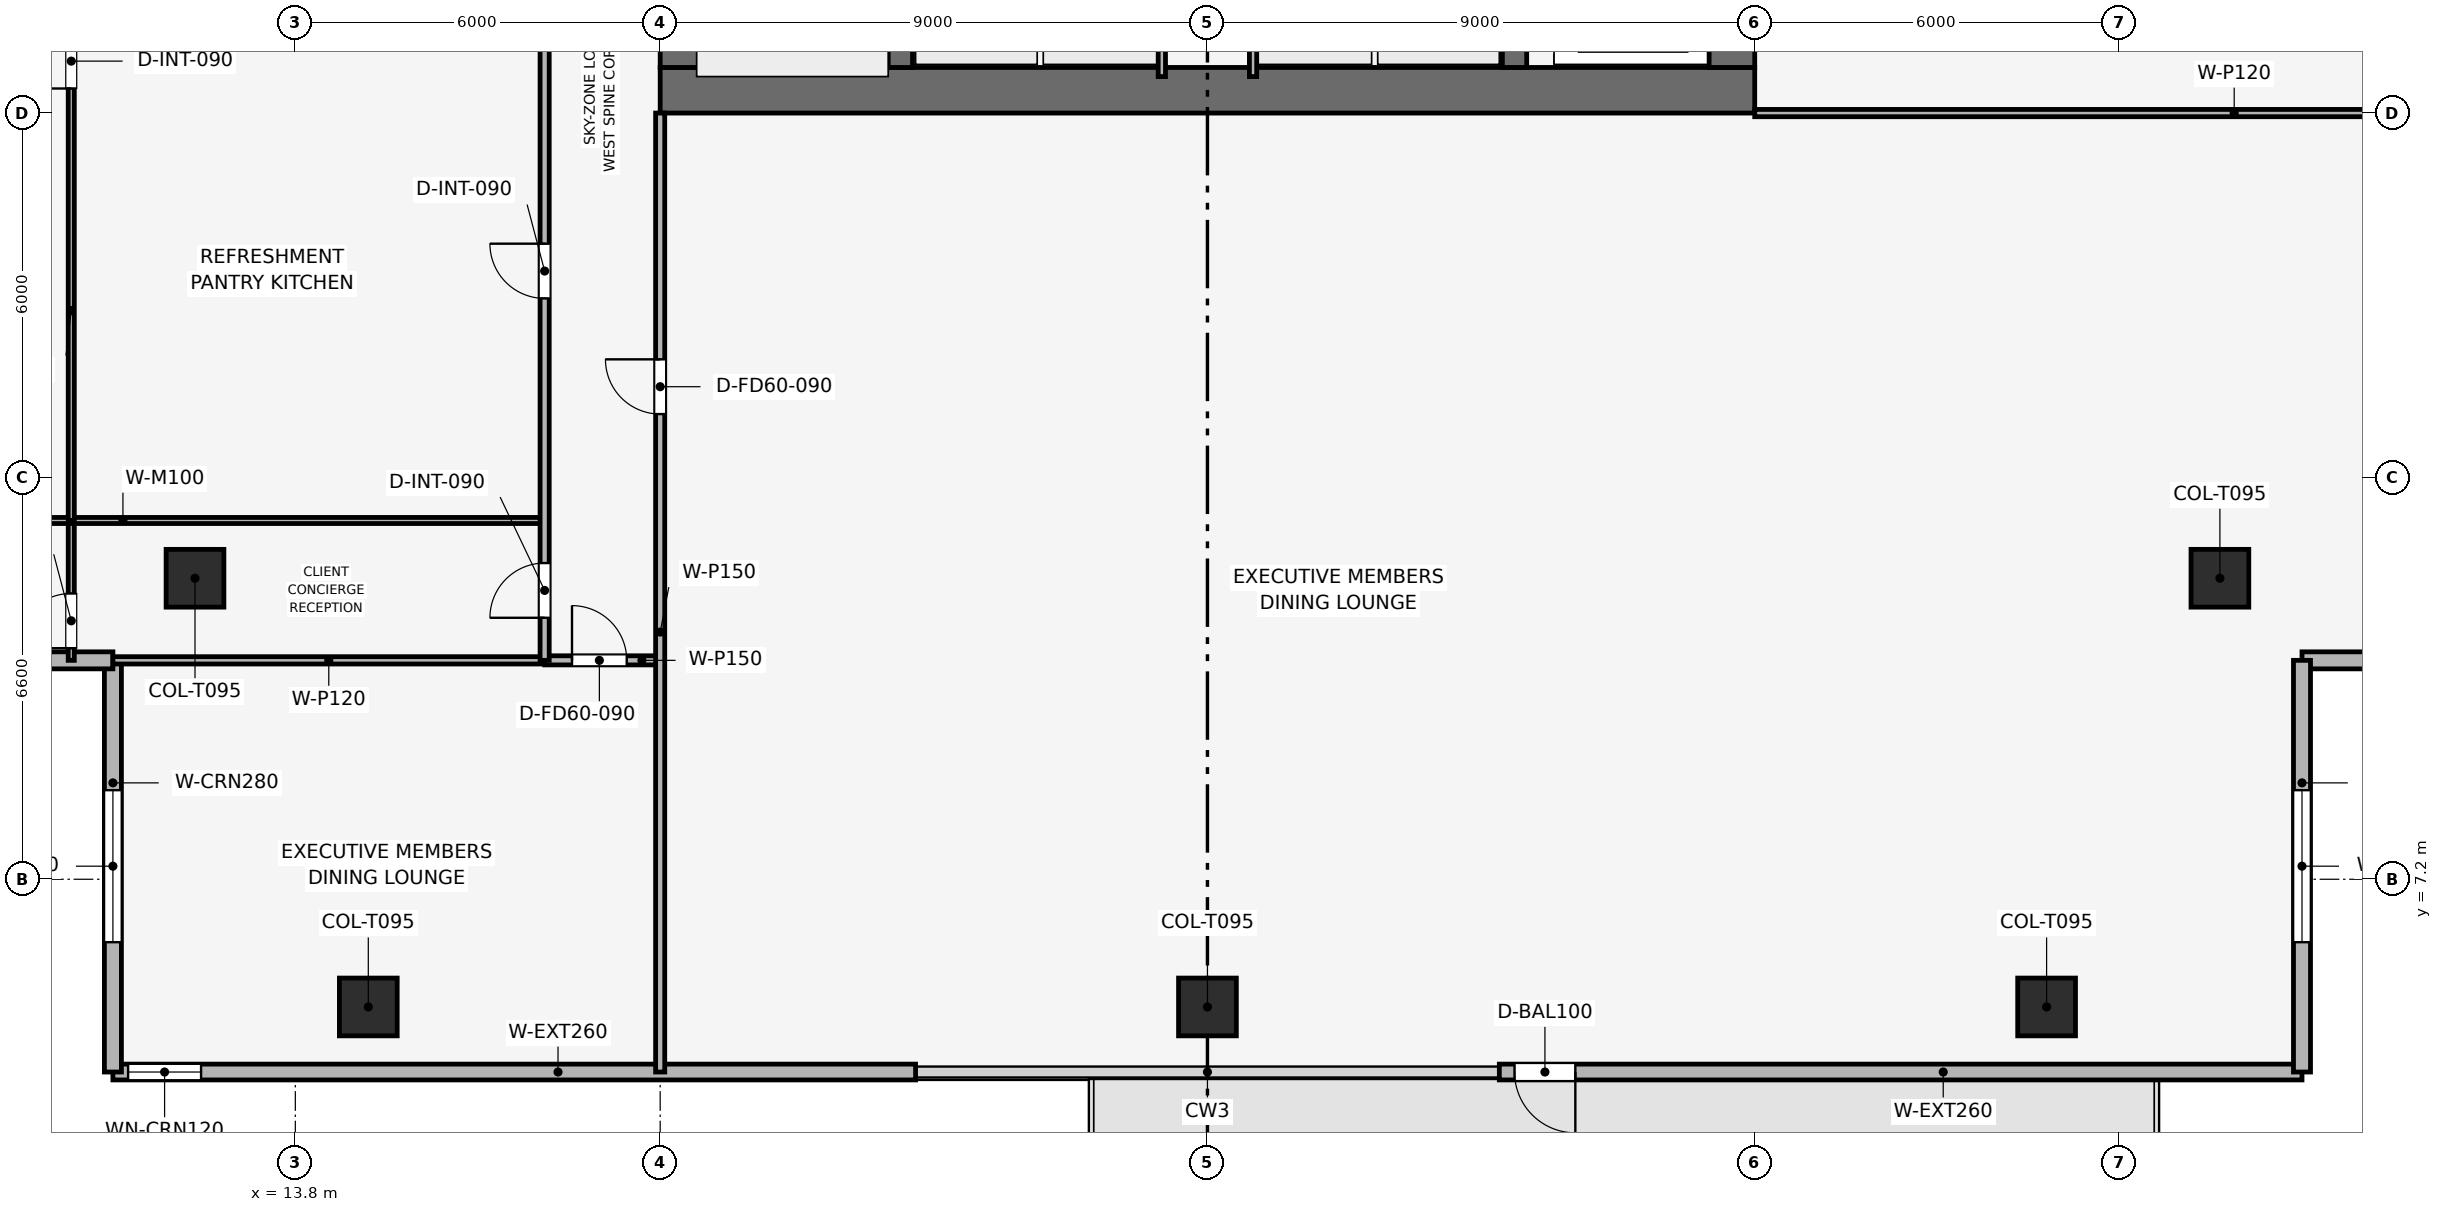
"""IFC4 building model, lengths in metres.
Left out: names, types, materials, properties, quantities, classifications, styles, units other than length and angle.
Written with IfcOpenShell. Run it as: python <this file> out.ifc"""

import sys

from ifc_helpers import new_model, si_unit, direction, frame, frame_2d, origin, origin_2d, place, context, subcontext, project, spatial, rectangle, extrude, element, fill, save


model = new_model("IFC4")
c1 = context("Model", 3, precision=1e-05, world=origin(), true_north=direction((0.0, 1.0)))
c2 = subcontext(c1, "Body", "Model", "MODEL_VIEW")
j1 = project(units=[si_unit("LENGTHUNIT", "METRE"), si_unit("PLANEANGLEUNIT", "RADIAN")], contexts=[c1])
p1 = place(None, origin())
s1 = spatial("IfcSite", under=j1, at=p1, CompositionType="ELEMENT")
p2 = place(p1, origin())
s2 = spatial("IfcBuilding", under=s1, at=p2, CompositionType="ELEMENT")
p3 = place(p2, frame((0.0, 0.0, 257.85)))
s3 = spatial("IfcBuildingStorey", under=s2, at=p3, CompositionType="ELEMENT", Elevation=257.85)
p4 = place(p3, frame((19.8, 20.175, 0.0), z_axis=(0.0, 0.0, 1.0), x_axis=(1.0, 0.0, 0.0)))
e1 = element("IfcWall", 1, at=p4, inside=s3, PredefinedType="SHEAR", context=c2, shape_type="SweptSolid", body=[
    extrude(rectangle(XDim=18.0, YDim=0.75, at=frame_2d((9.0, 0.0))), origin(), (0.0, 0.0, 1.0), 3.75),
])
p5 = place(p3, frame((20.175, 20.55, 0.0), z_axis=(0.0, 0.0, 1.0), x_axis=(0.0, 1.0, 0.0)))
e2 = element("IfcWall", 2, at=p5, inside=s3, PredefinedType="SHEAR", context=c2, shape_type="SweptSolid", body=[
    extrude(rectangle(XDim=16.5, YDim=0.75, at=frame_2d((8.25, 0.0))), origin(), (0.0, 0.0, 1.0), 3.75),
])
p6 = place(p5, frame((10.25, 0.0, 0.0)))
e3 = element("IfcOpeningElement", 3, at=p6, cuts=e2, PredefinedType="OPENING", context=c2, shape_type="SweptSolid", body=[
    extrude(rectangle(XDim=1.1, YDim=2.15, at=frame_2d((0.55, 1.075))), frame((0.0, 0.385, 0.0), z_axis=(0.0, -1.0, 0.0), x_axis=(1.0, 0.0, 0.0)), (0.0, 0.0, 1.0), 0.77),
])
p7 = place(p3, frame((37.425, 20.55, 0.0), z_axis=(0.0, 0.0, 1.0), x_axis=(0.0, 1.0, 0.0)))
e4 = element("IfcWall", 4, at=p7, inside=s3, PredefinedType="SHEAR", context=c2, shape_type="SweptSolid", body=[
    extrude(rectangle(XDim=16.5, YDim=0.75, at=frame_2d((8.25, 0.0))), origin(), (0.0, 0.0, 1.0), 3.75),
])
p8 = place(p7, frame((4.75, 0.0, 0.0)))
e5 = element("IfcOpeningElement", 5, at=p8, cuts=e4, PredefinedType="OPENING", context=c2, shape_type="SweptSolid", body=[
    extrude(rectangle(XDim=1.1, YDim=2.15, at=frame_2d((0.55, 1.075))), frame((0.0, 0.385, 0.0), z_axis=(0.0, -1.0, 0.0), x_axis=(1.0, 0.0, 0.0)), (0.0, 0.0, 1.0), 0.77),
])
for number, where, z_axis, x_axis in (
    (6, (23.75, 20.55, 0.0), (0.0, 0.0, 1.0), (0.0, 1.0, 0.0)),
    (7, (33.85, 20.55, 0.0), (0.0, 0.0, 1.0), (0.0, 1.0, 0.0)),
):
    element("IfcWall", number, at=place(p3, frame(where, z_axis=z_axis, x_axis=x_axis)), inside=s3, PredefinedType="SHEAR", context=c2, shape_type="SweptSolid", body=[
        extrude(rectangle(XDim=16.5, YDim=0.4, at=frame_2d((8.25, 0.0))), origin(), (0.0, 0.0, 1.0), 3.75),
    ])
for number, where, z_axis, x_axis in (
    (8, (15.0, 5.1, 0.003), (0.0, 0.0, 1.0), (1.0, 0.0, 0.0)),
    (9, (28.8, 5.1, 0.003), (0.0, 0.0, 1.0), (1.0, 0.0, 0.0)),
    (10, (42.6, 5.1, 0.003), (0.0, 0.0, 1.0), (1.0, 0.0, 0.0)),
    (11, (12.15, 12.15, 0.003), (0.0, 0.0, 1.0), (1.0, 0.0, 0.0)),
    (12, (45.45, 12.15, 0.003), (0.0, 0.0, 1.0), (1.0, 0.0, 0.0)),
):
    element("IfcColumn", number, at=place(p3, frame(where, z_axis=z_axis, x_axis=x_axis)), inside=s3, PredefinedType="COLUMN", context=c2, shape_type="SweptSolid", body=[
        extrude(rectangle(XDim=0.95, YDim=0.95, at=origin_2d()), origin(), (0.0, 0.0, 1.0), 3.494),
    ])
p9 = place(p3, frame((46.8, 4.03, 0.0), z_axis=(0.0, 0.0, 1.0), x_axis=(-1.0, 0.0, 0.0)))
e13 = element("IfcWall", 13, at=p9, inside=s3, PredefinedType="SOLIDWALL", context=c2, shape_type="SweptSolid", body=[
    extrude(rectangle(XDim=13.2, YDim=0.26, at=frame_2d((6.6, 0.0))), origin(), (0.0, 0.0, 1.0), 3.5),
])
p10 = place(p9, frame((11.95, 0.0, 0.0)))
e14 = element("IfcOpeningElement", 14, at=p10, cuts=e13, PredefinedType="OPENING", context=c2, shape_type="SweptSolid", body=[
    extrude(rectangle(XDim=1.0, YDim=2.2, at=frame_2d((0.5, 1.1))), frame((0.0, 0.14, 0.0), z_axis=(0.0, -1.0, 0.0), x_axis=(1.0, 0.0, 0.0)), (0.0, 0.0, 1.0), 0.28),
])
p11 = place(p3, frame((24.0, 4.03, 0.0), z_axis=(0.0, 0.0, 1.0), x_axis=(-1.0, 0.0, 0.0)))
e15 = element("IfcWall", 15, at=p11, inside=s3, PredefinedType="SOLIDWALL", context=c2, shape_type="SweptSolid", body=[
    extrude(rectangle(XDim=13.2, YDim=0.26, at=frame_2d((6.6, 0.0))), origin(), (0.0, 0.0, 1.0), 3.5),
])
p12 = place(p11, frame((11.75, 0.0, 0.9)))
e16 = element("IfcOpeningElement", 16, at=p12, cuts=e15, PredefinedType="OPENING", context=c2, shape_type="SweptSolid", body=[
    extrude(rectangle(XDim=1.2, YDim=2.1, at=frame_2d((0.6, 1.05))), frame((0.0, 0.14, 0.0), z_axis=(0.0, -1.0, 0.0), x_axis=(1.0, 0.0, 0.0)), (0.0, 0.0, 1.0), 0.28),
])
p13 = place(p3, frame((10.8, 4.03, 0.0), z_axis=(0.0, 0.0, 1.0), x_axis=(0.0, 1.0, 0.0)))
e17 = element("IfcWall", 17, at=p13, inside=s3, PredefinedType="SOLIDWALL", context=c2, shape_type="SweptSolid", body=[
    extrude(rectangle(XDim=6.77, YDim=0.28, at=frame_2d((3.385, 0.0))), origin(), (0.0, 0.0, 1.0), 3.5),
])
p14 = place(p13, frame((2.135, 0.0, 0.9)))
e18 = element("IfcOpeningElement", 18, at=p14, cuts=e17, PredefinedType="OPENING", context=c2, shape_type="SweptSolid", body=[
    extrude(rectangle(XDim=2.5, YDim=1.9, at=frame_2d((1.25, 0.95))), frame((0.0, 0.15, 0.0), z_axis=(0.0, -1.0, 0.0), x_axis=(1.0, 0.0, 0.0)), (0.0, 0.0, 1.0), 0.3),
])
p15 = place(p3, frame((10.8, 10.8, 0.0), z_axis=(0.0, 0.0, 1.0), x_axis=(-1.0, 0.0, 0.0)))
e19 = element("IfcWall", 19, at=p15, inside=s3, PredefinedType="SOLIDWALL", context=c2, shape_type="SweptSolid", body=[
    extrude(rectangle(XDim=6.77, YDim=0.28, at=frame_2d((3.385, 0.0))), origin(), (0.0, 0.0, 1.0), 3.5),
])
p16 = place(p15, frame((2.135, 0.0, 0.9)))
e20 = element("IfcOpeningElement", 20, at=p16, cuts=e19, PredefinedType="OPENING", context=c2, shape_type="SweptSolid", body=[
    extrude(rectangle(XDim=2.5, YDim=1.9, at=frame_2d((1.25, 0.95))), frame((0.0, 0.15, 0.0), z_axis=(0.0, -1.0, 0.0), x_axis=(1.0, 0.0, 0.0)), (0.0, 0.0, 1.0), 0.3),
])
p17 = place(p3, frame((53.57, 10.8, 0.0), z_axis=(0.0, 0.0, 1.0), x_axis=(-1.0, 0.0, 0.0)))
e21 = element("IfcWall", 21, at=p17, inside=s3, PredefinedType="SOLIDWALL", context=c2, shape_type="SweptSolid", body=[
    extrude(rectangle(XDim=6.77, YDim=0.28, at=frame_2d((3.385, 0.0))), origin(), (0.0, 0.0, 1.0), 3.5),
])
p18 = place(p17, frame((2.135, 0.0, 0.9)))
e22 = element("IfcOpeningElement", 22, at=p18, cuts=e21, PredefinedType="OPENING", context=c2, shape_type="SweptSolid", body=[
    extrude(rectangle(XDim=2.5, YDim=1.9, at=frame_2d((1.25, 0.95))), frame((0.0, 0.15, 0.0), z_axis=(0.0, -1.0, 0.0), x_axis=(1.0, 0.0, 0.0)), (0.0, 0.0, 1.0), 0.3),
])
p19 = place(p3, frame((46.8, 10.8, 0.0), z_axis=(0.0, 0.0, 1.0), x_axis=(0.0, -1.0, 0.0)))
e23 = element("IfcWall", 23, at=p19, inside=s3, PredefinedType="SOLIDWALL", context=c2, shape_type="SweptSolid", body=[
    extrude(rectangle(XDim=6.77, YDim=0.28, at=frame_2d((3.385, 0.0))), origin(), (0.0, 0.0, 1.0), 3.5),
])
p20 = place(p19, frame((2.135, 0.0, 0.9)))
e24 = element("IfcOpeningElement", 24, at=p20, cuts=e23, PredefinedType="OPENING", context=c2, shape_type="SweptSolid", body=[
    extrude(rectangle(XDim=2.5, YDim=1.9, at=frame_2d((1.25, 0.95))), frame((0.0, 0.15, 0.0), z_axis=(0.0, -1.0, 0.0), x_axis=(1.0, 0.0, 0.0)), (0.0, 0.0, 1.0), 0.3),
])
for number, where, z_axis, x_axis in (
    (25, (28.05, 20.4, 0.0), (0.0, 0.0, 1.0), (0.0, 1.0, 0.0)),
    (26, (29.55, 20.4, 0.0), (0.0, 0.0, 1.0), (0.0, 1.0, 0.0)),
):
    element("IfcWall", number, at=place(p3, frame(where, z_axis=z_axis, x_axis=x_axis)), inside=s3, PredefinedType="PARTITIONING", context=c2, shape_type="SweptSolid", body=[
        extrude(rectangle(XDim=8.15, YDim=0.12, at=frame_2d((4.075, 0.0))), origin(), (0.0, 0.0, 1.0), 3.5),
    ])
p21 = place(p3, frame((10.115, 10.8, 0.0), z_axis=(0.0, 0.0, 1.0), x_axis=(0.0, 1.0, 0.0)))
e27 = element("IfcWall", 27, at=p21, inside=s3, PredefinedType="MOVABLE", context=c2, shape_type="SweptSolid", body=[
    extrude(rectangle(XDim=2.3, YDim=0.1, at=frame_2d((1.15, 0.0))), origin(), (0.0, 0.0, 1.0), 3.085),
])
p22 = place(p21, frame((0.2, 0.0, 0.0)))
e28 = element("IfcOpeningElement", 28, at=p22, cuts=e27, PredefinedType="OPENING", context=c2, shape_type="SweptSolid", body=[
    extrude(rectangle(XDim=0.9, YDim=2.1, at=frame_2d((0.45, 1.05))), frame((0.0, 0.06, 0.0), z_axis=(0.0, -1.0, 0.0), x_axis=(1.0, 0.0, 0.0)), (0.0, 0.0, 1.0), 0.12),
])
p23 = place(p3, frame((4.03, 13.1, 0.0), z_axis=(0.0, 0.0, 1.0), x_axis=(1.0, 0.0, 0.0)))
e29 = element("IfcWall", 29, at=p23, inside=s3, PredefinedType="MOVABLE", context=c2, shape_type="SweptSolid", body=[
    extrude(rectangle(XDim=13.87, YDim=0.1, at=frame_2d((6.935, 0.0))), origin(), (0.0, 0.0, 1.0), 3.085),
])
p24 = place(p3, frame((10.115, 13.1, 0.0), z_axis=(0.0, 0.0, 1.0), x_axis=(0.0, 1.0, 0.0)))
e30 = element("IfcWall", 30, at=p24, inside=s3, PredefinedType="MOVABLE", context=c2, shape_type="SweptSolid", body=[
    extrude(rectangle(XDim=8.204, YDim=0.1, at=frame_2d((4.102, 0.0))), origin(), (0.0, 0.0, 1.0), 3.085),
])
p25 = place(p24, frame((7.104, 0.0, 0.0)))
e31 = element("IfcOpeningElement", 31, at=p25, cuts=e30, PredefinedType="OPENING", context=c2, shape_type="SweptSolid", body=[
    extrude(rectangle(XDim=0.9, YDim=2.1, at=frame_2d((0.45, 1.05))), frame((0.0, 0.06, 0.0), z_axis=(0.0, -1.0, 0.0), x_axis=(1.0, 0.0, 0.0)), (0.0, 0.0, 1.0), 0.12),
])
p26 = place(p3, frame((10.8, 10.8, 0.0), z_axis=(0.0, 0.0, 1.0), x_axis=(1.0, 0.0, 0.0)))
e32 = element("IfcWall", 32, at=p26, inside=s3, PredefinedType="PARTITIONING", context=c2, shape_type="SweptSolid", body=[
    extrude(rectangle(XDim=7.1, YDim=0.12, at=frame_2d((3.55, 0.0))), origin(), (0.0, 0.0, 1.0), 3.085),
])
p27 = place(p3, frame((17.9, 10.8, 0.0), z_axis=(0.0, 0.0, 1.0), x_axis=(1.0, 0.0, 0.0)))
e33 = element("IfcWall", 33, at=p27, inside=s3, PredefinedType="PARTITIONING", context=c2, shape_type="SweptSolid", body=[
    extrude(rectangle(XDim=1.9, YDim=0.15, at=frame_2d((0.95, 0.0))), origin(), (0.0, 0.0, 1.0), 3.5),
])
p28 = place(p27, frame((0.45, 0.0, 0.0)))
e34 = element("IfcOpeningElement", 34, at=p28, cuts=e33, PredefinedType="OPENING", context=c2, shape_type="SweptSolid", body=[
    extrude(rectangle(XDim=0.9, YDim=2.1, at=frame_2d((0.45, 1.05))), frame((0.0, 0.085, 0.0), z_axis=(0.0, -1.0, 0.0), x_axis=(1.0, 0.0, 0.0)), (0.0, 0.0, 1.0), 0.17),
])
p29 = place(p3, frame((19.8, 4.03, 0.0), z_axis=(0.0, 0.0, 1.0), x_axis=(0.0, 1.0, 0.0)))
e35 = element("IfcWall", 35, at=p29, inside=s3, PredefinedType="PARTITIONING", context=c2, shape_type="SweptSolid", body=[
    extrude(rectangle(XDim=15.77, YDim=0.15, at=frame_2d((7.885, 0.0))), origin(), (0.0, 0.0, 1.0), 3.085),
])
p30 = place(p29, frame((10.82, 0.0, 0.0)))
e36 = element("IfcOpeningElement", 36, at=p30, cuts=e35, PredefinedType="OPENING", context=c2, shape_type="SweptSolid", body=[
    extrude(rectangle(XDim=0.9, YDim=2.1, at=frame_2d((0.45, 1.05))), frame((0.0, 0.085, 0.0), z_axis=(0.0, -1.0, 0.0), x_axis=(1.0, 0.0, 0.0)), (0.0, 0.0, 1.0), 0.17),
])
p31 = place(p3, frame((37.8, 19.8, 0.0), z_axis=(0.0, 0.0, 1.0), x_axis=(1.0, 0.0, 0.0)))
e37 = element("IfcWall", 37, at=p31, inside=s3, PredefinedType="PARTITIONING", context=c2, shape_type="SweptSolid", body=[
    extrude(rectangle(XDim=15.77, YDim=0.12, at=frame_2d((7.885, 0.0))), origin(), (0.0, 0.0, 1.0), 3.085),
])
p32 = place(p3, frame((17.9, 10.8, 0.0), z_axis=(0.0, 0.0, 1.0), x_axis=(0.0, 1.0, 0.0)))
e38 = element("IfcWall", 38, at=p32, inside=s3, PredefinedType="PARTITIONING", context=c2, shape_type="SweptSolid", body=[
    extrude(rectangle(XDim=28.9, YDim=0.15, at=frame_2d((14.45, 0.0))), origin(), (0.0, 0.0, 1.0), 3.085),
])
p33 = place(p32, frame((0.7, 0.0, 0.0)))
e39 = element("IfcOpeningElement", 39, at=p33, cuts=e38, PredefinedType="OPENING", context=c2, shape_type="SweptSolid", body=[
    extrude(rectangle(XDim=0.9, YDim=2.1, at=frame_2d((0.45, 1.05))), frame((0.0, 0.085, 0.0), z_axis=(0.0, -1.0, 0.0), x_axis=(1.0, 0.0, 0.0)), (0.0, 0.0, 1.0), 0.17),
])
p34 = place(p32, frame((5.952, 0.0, 0.0)))
e40 = element("IfcOpeningElement", 40, at=p34, cuts=e38, PredefinedType="OPENING", context=c2, shape_type="SweptSolid", body=[
    extrude(rectangle(XDim=0.9, YDim=2.1, at=frame_2d((0.45, 1.05))), frame((0.0, 0.085, 0.0), z_axis=(0.0, -1.0, 0.0), x_axis=(1.0, 0.0, 0.0)), (0.0, 0.0, 1.0), 0.17),
])
p35 = place(p32, frame((14.02, 0.0, 0.0)))
e41 = element("IfcOpeningElement", 41, at=p35, cuts=e38, PredefinedType="OPENING", context=c2, shape_type="SweptSolid", body=[
    extrude(rectangle(XDim=0.9, YDim=2.1, at=frame_2d((0.45, 1.05))), frame((0.0, 0.085, 0.0), z_axis=(0.0, -1.0, 0.0), x_axis=(1.0, 0.0, 0.0)), (0.0, 0.0, 1.0), 0.17),
])
p36 = place(p32, frame((23.217, 0.0, 0.0)))
e42 = element("IfcOpeningElement", 42, at=p36, cuts=e38, PredefinedType="OPENING", context=c2, shape_type="SweptSolid", body=[
    extrude(rectangle(XDim=0.9, YDim=2.1, at=frame_2d((0.45, 1.05))), frame((0.0, 0.085, 0.0), z_axis=(0.0, -1.0, 0.0), x_axis=(1.0, 0.0, 0.0)), (0.0, 0.0, 1.0), 0.17),
])
p37 = place(p10, origin())
e43 = element("IfcDoor", 43, at=p37, inside=s3, OperationType="SINGLE_SWING_LEFT", PredefinedType="DOOR", context=c2, shape_type="SweptSolid", body=[
    extrude(rectangle(XDim=1.0, YDim=2.2, at=frame_2d((0.5, 1.1))), frame((0.0, 0.025, 0.0), z_axis=(0.0, -1.0, 0.0), x_axis=(1.0, 0.0, 0.0)), (0.0, 0.0, 1.0), 0.05),
])
fill(e14, e43)
p38 = place(p12, origin())
e44 = element("IfcWindow", 44, at=p38, inside=s3, PartitioningType="SINGLE_PANEL", PredefinedType="WINDOW", context=c2, shape_type="SweptSolid", body=[
    extrude(rectangle(XDim=1.2, YDim=2.1, at=frame_2d((0.6, 1.05))), frame((0.0, 0.03, 0.0), z_axis=(0.0, -1.0, 0.0), x_axis=(1.0, 0.0, 0.0)), (0.0, 0.0, 1.0), 0.06),
])
fill(e16, e44)
p39 = place(p14, origin())
e45 = element("IfcWindow", 45, at=p39, inside=s3, PartitioningType="SINGLE_PANEL", PredefinedType="WINDOW", context=c2, shape_type="SweptSolid", body=[
    extrude(rectangle(XDim=2.5, YDim=1.9, at=frame_2d((1.25, 0.95))), frame((0.0, 0.03, 0.0), z_axis=(0.0, -1.0, 0.0), x_axis=(1.0, 0.0, 0.0)), (0.0, 0.0, 1.0), 0.06),
])
fill(e18, e45)
p40 = place(p20, origin())
e46 = element("IfcWindow", 46, at=p40, inside=s3, PartitioningType="SINGLE_PANEL", PredefinedType="WINDOW", context=c2, shape_type="SweptSolid", body=[
    extrude(rectangle(XDim=2.5, YDim=1.9, at=frame_2d((1.25, 0.95))), frame((0.0, 0.03, 0.0), z_axis=(0.0, -1.0, 0.0), x_axis=(1.0, 0.0, 0.0)), (0.0, 0.0, 1.0), 0.06),
])
fill(e24, e46)
p41 = place(p22, origin())
e47 = element("IfcDoor", 47, at=p41, inside=s3, OperationType="SINGLE_SWING_LEFT", PredefinedType="DOOR", context=c2, shape_type="SweptSolid", body=[
    extrude(rectangle(XDim=0.9, YDim=2.1, at=frame_2d((0.45, 1.05))), frame((0.0, 0.025, 0.0), z_axis=(0.0, -1.0, 0.0), x_axis=(1.0, 0.0, 0.0)), (0.0, 0.0, 1.0), 0.05),
])
fill(e28, e47)
p42 = place(p25, origin())
e48 = element("IfcDoor", 48, at=p42, inside=s3, OperationType="SINGLE_SWING_LEFT", PredefinedType="DOOR", context=c2, shape_type="SweptSolid", body=[
    extrude(rectangle(XDim=0.9, YDim=2.1, at=frame_2d((0.45, 1.05))), frame((0.0, 0.025, 0.0), z_axis=(0.0, -1.0, 0.0), x_axis=(1.0, 0.0, 0.0)), (0.0, 0.0, 1.0), 0.05),
])
fill(e31, e48)
p43 = place(p28, origin())
e49 = element("IfcDoor", 49, at=p43, inside=s3, OperationType="SINGLE_SWING_LEFT", PredefinedType="DOOR", context=c2, shape_type="SweptSolid", body=[
    extrude(rectangle(XDim=0.9, YDim=2.1, at=frame_2d((0.45, 1.05))), frame((0.0, 0.025, 0.0), z_axis=(0.0, -1.0, 0.0), x_axis=(1.0, 0.0, 0.0)), (0.0, 0.0, 1.0), 0.05),
])
fill(e34, e49)
p44 = place(p30, origin())
e50 = element("IfcDoor", 50, at=p44, inside=s3, OperationType="SINGLE_SWING_RIGHT", PredefinedType="DOOR", context=c2, shape_type="SweptSolid", body=[
    extrude(rectangle(XDim=0.9, YDim=2.1, at=frame_2d((0.45, 1.05))), frame((0.0, 0.025, 0.0), z_axis=(0.0, -1.0, 0.0), x_axis=(1.0, 0.0, 0.0)), (0.0, 0.0, 1.0), 0.05),
])
fill(e36, e50)
p45 = place(p33, origin())
e51 = element("IfcDoor", 51, at=p45, inside=s3, OperationType="SINGLE_SWING_LEFT", PredefinedType="DOOR", context=c2, shape_type="SweptSolid", body=[
    extrude(rectangle(XDim=0.9, YDim=2.1, at=frame_2d((0.45, 1.05))), frame((0.0, 0.025, 0.0), z_axis=(0.0, -1.0, 0.0), x_axis=(1.0, 0.0, 0.0)), (0.0, 0.0, 1.0), 0.05),
])
fill(e39, e51)
p46 = place(p34, origin())
e52 = element("IfcDoor", 52, at=p46, inside=s3, OperationType="SINGLE_SWING_RIGHT", PredefinedType="DOOR", context=c2, shape_type="SweptSolid", body=[
    extrude(rectangle(XDim=0.9, YDim=2.1, at=frame_2d((0.45, 1.05))), frame((0.0, 0.025, 0.0), z_axis=(0.0, -1.0, 0.0), x_axis=(1.0, 0.0, 0.0)), (0.0, 0.0, 1.0), 0.05),
])
fill(e40, e52)
save(model, sys.argv[1])
